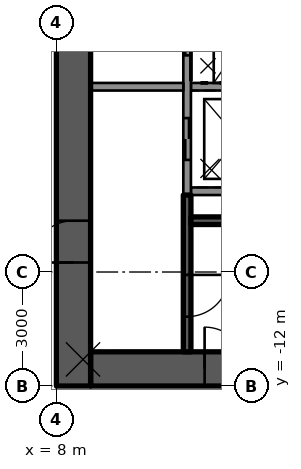
"""IFC4 building model, lengths in metres.
Left out: names, types, materials, properties, quantities, classifications, styles, units other than length and angle.
Written with IfcOpenShell. Run it as: python <this file> out.ifc"""

import sys

from ifc_helpers import new_model, si_unit, direction, frame, frame_2d, origin, place, context, subcontext, project, spatial, rectangle, extrude, element, fill, save


model = new_model("IFC4")
c1 = context("Model", 3, precision=1e-05, world=origin(), true_north=direction((0.0, 1.0)))
c2 = subcontext(c1, "Body", "Model", "MODEL_VIEW")
j1 = project(units=[si_unit("LENGTHUNIT", "METRE"), si_unit("PLANEANGLEUNIT", "RADIAN")], contexts=[c1])
p1 = place(None, origin())
s1 = spatial("IfcSite", under=j1, at=p1, CompositionType="ELEMENT")
p2 = place(p1, origin())
s2 = spatial("IfcBuilding", under=s1, at=p2, CompositionType="ELEMENT")
p3 = place(p2, frame((0.0, 0.0, 141.2)))
s3 = spatial("IfcBuildingStorey", under=s2, at=p3, CompositionType="ELEMENT", Elevation=141.2)
p4 = place(p3, frame((8.9, -11.55, 0.0), z_axis=(0.0, 0.0, 1.0), x_axis=(1.0, 0.0, 0.0)))
e1 = element("IfcWall", 1, at=p4, inside=s3, PredefinedType="SHEAR", context=c2, shape_type="SweptSolid", body=[
    extrude(rectangle(XDim=9.2, YDim=0.9, at=frame_2d((4.6, 0.0))), origin(), (0.0, 0.0, 1.0), 4.4),
])
p5 = place(p4, frame((3.0, 0.0, 0.0)))
e2 = element("IfcOpeningElement", 2, at=p5, cuts=e1, PredefinedType="OPENING", context=c2, shape_type="SweptSolid", body=[
    extrude(rectangle(XDim=1.1, YDim=2.1, at=frame_2d((0.55, 1.05))), frame((0.0, 0.46, 0.0), z_axis=(0.0, -1.0, 0.0), x_axis=(1.0, 0.0, 0.0)), (0.0, 0.0, 1.0), 0.92),
])
p6 = place(p3, frame((8.45, -12.0, 0.0), z_axis=(0.0, 0.0, 1.0), x_axis=(0.0, 1.0, 0.0)))
e3 = element("IfcWall", 3, at=p6, inside=s3, PredefinedType="SHEAR", context=c2, shape_type="SweptSolid", body=[
    extrude(rectangle(XDim=24.0, YDim=0.9, at=frame_2d((12.0, 0.0))), origin(), (0.0, 0.0, 1.0), 4.4),
])
p7 = place(p6, frame((12.6, 0.0, 0.0)))
e4 = element("IfcOpeningElement", 4, at=p7, cuts=e3, PredefinedType="OPENING", context=c2, shape_type="SweptSolid", body=[
    extrude(rectangle(XDim=1.8, YDim=2.1, at=frame_2d((0.9, 1.05))), frame((0.0, 0.46, 0.0), z_axis=(0.0, -1.0, 0.0), x_axis=(1.0, 0.0, 0.0)), (0.0, 0.0, 1.0), 0.92),
])
p8 = place(p6, frame((16.3, 0.0, 0.0)))
e5 = element("IfcOpeningElement", 5, at=p8, cuts=e3, PredefinedType="OPENING", context=c2, shape_type="SweptSolid", body=[
    extrude(rectangle(XDim=1.8, YDim=2.1, at=frame_2d((0.9, 1.05))), frame((0.0, 0.46, 0.0), z_axis=(0.0, -1.0, 0.0), x_axis=(1.0, 0.0, 0.0)), (0.0, 0.0, 1.0), 0.92),
])
p9 = place(p6, frame((9.6, 0.0, 0.0)))
e6 = element("IfcOpeningElement", 6, at=p9, cuts=e3, PredefinedType="OPENING", context=c2, shape_type="SweptSolid", body=[
    extrude(rectangle(XDim=1.8, YDim=2.1, at=frame_2d((0.9, 1.05))), frame((0.0, 0.46, 0.0), z_axis=(0.0, -1.0, 0.0), x_axis=(1.0, 0.0, 0.0)), (0.0, 0.0, 1.0), 0.92),
])
p10 = place(p6, frame((3.25, 0.0, 0.0)))
e7 = element("IfcOpeningElement", 7, at=p10, cuts=e3, PredefinedType="OPENING", context=c2, shape_type="SweptSolid", body=[
    extrude(rectangle(XDim=1.1, YDim=2.1, at=frame_2d((0.55, 1.05))), frame((0.0, 0.46, 0.0), z_axis=(0.0, -1.0, 0.0), x_axis=(1.0, 0.0, 0.0)), (0.0, 0.0, 1.0), 0.92),
])
p11 = place(p6, frame((21.0, 0.0, 0.0)))
e8 = element("IfcOpeningElement", 8, at=p11, cuts=e3, PredefinedType="OPENING", context=c2, shape_type="SweptSolid", body=[
    extrude(rectangle(XDim=0.8, YDim=2.1, at=frame_2d((0.4, 1.05))), frame((0.0, 0.46, 0.0), z_axis=(0.0, -1.0, 0.0), x_axis=(1.0, 0.0, 0.0)), (0.0, 0.0, 1.0), 0.92),
])
p12 = place(p3, frame((11.54, -6.875, 0.0), z_axis=(0.0, 0.0, 1.0), x_axis=(1.0, 0.0, 0.0)))
e9 = element("IfcWall", 9, at=p12, inside=s3, PredefinedType="SOLIDWALL", context=c2, shape_type="SweptSolid", body=[
    extrude(rectangle(XDim=6.56, YDim=0.2, at=frame_2d((3.28, 0.0))), origin(), (0.0, 0.0, 1.0), 3.99),
])
p13 = place(p3, frame((11.54, -4.125, 0.0), z_axis=(0.0, 0.0, 1.0), x_axis=(1.0, 0.0, 0.0)))
e10 = element("IfcWall", 10, at=p13, inside=s3, PredefinedType="SOLIDWALL", context=c2, shape_type="SweptSolid", body=[
    extrude(rectangle(XDim=4.7, YDim=0.2, at=frame_2d((2.35, 0.0))), origin(), (0.0, 0.0, 1.0), 3.99),
])
p14 = place(p3, frame((11.44, 6.975, 0.0), z_axis=(0.0, 0.0, 1.0), x_axis=(0.0, -1.0, 0.0)))
e11 = element("IfcWall", 11, at=p14, inside=s3, PredefinedType="SOLIDWALL", context=c2, shape_type="SweptSolid", body=[
    extrude(rectangle(XDim=13.95, YDim=0.2, at=frame_2d((6.975, 0.0))), origin(), (0.0, 0.0, 1.0), 3.99),
])
p15 = place(p14, frame((3.675, 0.0, 0.0)))
e12 = element("IfcOpeningElement", 12, at=p15, cuts=e11, PredefinedType="OPENING", context=c2, shape_type="SweptSolid", body=[
    extrude(rectangle(XDim=1.1, YDim=2.1, at=frame_2d((0.55, 1.05))), frame((0.0, 0.11, 0.0), z_axis=(0.0, -1.0, 0.0), x_axis=(1.0, 0.0, 0.0)), (0.0, 0.0, 1.0), 0.22),
])
p16 = place(p14, frame((9.175, 0.0, 0.0)))
e13 = element("IfcOpeningElement", 13, at=p16, cuts=e11, PredefinedType="OPENING", context=c2, shape_type="SweptSolid", body=[
    extrude(rectangle(XDim=1.1, YDim=2.1, at=frame_2d((0.55, 1.05))), frame((0.0, 0.11, 0.0), z_axis=(0.0, -1.0, 0.0), x_axis=(1.0, 0.0, 0.0)), (0.0, 0.0, 1.0), 0.22),
])
p17 = place(p14, frame((11.925, 0.0, 0.0)))
e14 = element("IfcOpeningElement", 14, at=p17, cuts=e11, PredefinedType="OPENING", context=c2, shape_type="SweptSolid", body=[
    extrude(rectangle(XDim=1.1, YDim=2.1, at=frame_2d((0.55, 1.05))), frame((0.0, 0.11, 0.0), z_axis=(0.0, -1.0, 0.0), x_axis=(1.0, 0.0, 0.0)), (0.0, 0.0, 1.0), 0.22),
])
p18 = place(p14, frame((1.075, 0.0, 0.0)))
e15 = element("IfcOpeningElement", 15, at=p18, cuts=e11, PredefinedType="OPENING", context=c2, shape_type="SweptSolid", body=[
    extrude(rectangle(XDim=0.8, YDim=2.1, at=frame_2d((0.4, 1.05))), frame((0.0, 0.11, 0.0), z_axis=(0.0, -1.0, 0.0), x_axis=(1.0, 0.0, 0.0)), (0.0, 0.0, 1.0), 0.22),
])
p19 = place(p14, frame((6.575, 0.0, 0.0)))
e16 = element("IfcOpeningElement", 16, at=p19, cuts=e11, PredefinedType="OPENING", context=c2, shape_type="SweptSolid", body=[
    extrude(rectangle(XDim=0.8, YDim=2.1, at=frame_2d((0.4, 1.05))), frame((0.0, 0.11, 0.0), z_axis=(0.0, -1.0, 0.0), x_axis=(1.0, 0.0, 0.0)), (0.0, 0.0, 1.0), 0.22),
])
p20 = place(p3, frame((11.44, -6.975, 0.0), z_axis=(0.0, 0.0, 1.0), x_axis=(0.0, -1.0, 0.0)))
e17 = element("IfcWall", 17, at=p20, inside=s3, PredefinedType="SOLIDWALL", context=c2, shape_type="SweptSolid", body=[
    extrude(rectangle(XDim=4.125, YDim=0.2, at=frame_2d((2.062, 0.0))), origin(), (0.0, 0.0, 1.0), 3.99),
])
p21 = place(p20, frame((2.1, 0.0, 0.0)))
e18 = element("IfcOpeningElement", 18, at=p21, cuts=e17, PredefinedType="OPENING", context=c2, shape_type="SweptSolid", body=[
    extrude(rectangle(XDim=1.1, YDim=2.1, at=frame_2d((0.55, 1.05))), frame((0.0, 0.11, 0.0), z_axis=(0.0, -1.0, 0.0), x_axis=(1.0, 0.0, 0.0)), (0.0, 0.0, 1.0), 0.22),
])
p22 = place(p3, frame((11.54, -7.65, 0.0), z_axis=(0.0, 0.0, 1.0), x_axis=(1.0, 0.0, 0.0)))
e19 = element("IfcWall", 19, at=p22, inside=s3, PredefinedType="SOLIDWALL", context=c2, shape_type="SweptSolid", body=[
    extrude(rectangle(XDim=6.56, YDim=0.2, at=frame_2d((3.28, 0.0))), origin(), (0.0, 0.0, 1.0), 3.99),
])
p23 = place(p3, frame((8.9, -4.125, 0.0), z_axis=(0.0, 0.0, 1.0), x_axis=(1.0, 0.0, 0.0)))
e20 = element("IfcWall", 20, at=p23, inside=s3, PredefinedType="PARTITIONING", context=c2, shape_type="SweptSolid", body=[
    extrude(rectangle(XDim=2.44, YDim=0.2, at=frame_2d((1.22, 0.0))), origin(), (0.0, 0.0, 1.0), 3.99),
])
p24 = place(p16, origin())
e21 = element("IfcDoor", 21, at=p24, inside=s3, OperationType="DOUBLE_DOOR_SLIDING", PredefinedType="DOOR", context=c2, shape_type="SweptSolid", body=[
    extrude(rectangle(XDim=1.1, YDim=2.1, at=frame_2d((0.55, 1.05))), frame((0.0, 0.025, 0.0), z_axis=(0.0, -1.0, 0.0), x_axis=(1.0, 0.0, 0.0)), (0.0, 0.0, 1.0), 0.05),
])
fill(e13, e21)
p25 = place(p17, origin())
e22 = element("IfcDoor", 22, at=p25, inside=s3, OperationType="DOUBLE_DOOR_SLIDING", PredefinedType="DOOR", context=c2, shape_type="SweptSolid", body=[
    extrude(rectangle(XDim=1.1, YDim=2.1, at=frame_2d((0.55, 1.05))), frame((0.0, 0.025, 0.0), z_axis=(0.0, -1.0, 0.0), x_axis=(1.0, 0.0, 0.0)), (0.0, 0.0, 1.0), 0.05),
])
fill(e14, e22)
p26 = place(p10, origin())
e23 = element("IfcDoor", 23, at=p26, inside=s3, OperationType="SINGLE_SWING_LEFT", PredefinedType="DOOR", context=c2, shape_type="SweptSolid", body=[
    extrude(rectangle(XDim=1.1, YDim=2.1, at=frame_2d((0.55, 1.05))), frame((0.0, 0.025, 0.0), z_axis=(0.0, -1.0, 0.0), x_axis=(1.0, 0.0, 0.0)), (0.0, 0.0, 1.0), 0.05),
])
fill(e7, e23)
p27 = place(p5, origin())
e24 = element("IfcDoor", 24, at=p27, inside=s3, OperationType="SINGLE_SWING_LEFT", PredefinedType="DOOR", context=c2, shape_type="SweptSolid", body=[
    extrude(rectangle(XDim=1.1, YDim=2.1, at=frame_2d((0.55, 1.05))), frame((0.0, 0.025, 0.0), z_axis=(0.0, -1.0, 0.0), x_axis=(1.0, 0.0, 0.0)), (0.0, 0.0, 1.0), 0.05),
])
fill(e2, e24)
p28 = place(p21, origin())
e25 = element("IfcDoor", 25, at=p28, inside=s3, OperationType="SINGLE_SWING_RIGHT", PredefinedType="DOOR", context=c2, shape_type="SweptSolid", body=[
    extrude(rectangle(XDim=1.1, YDim=2.1, at=frame_2d((0.55, 1.05))), frame((0.0, 0.025, 0.0), z_axis=(0.0, -1.0, 0.0), x_axis=(1.0, 0.0, 0.0)), (0.0, 0.0, 1.0), 0.05),
])
fill(e18, e25)
save(model, sys.argv[1])
